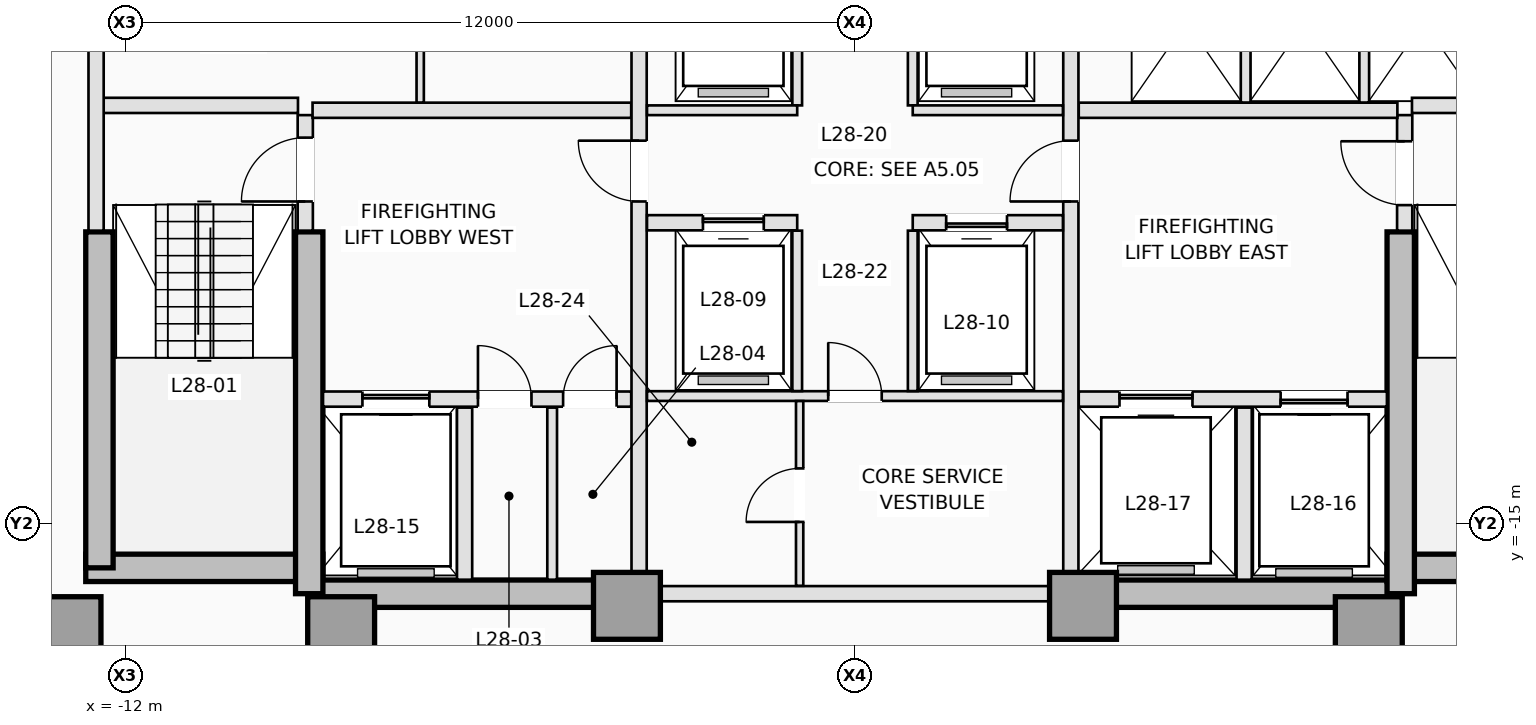
"""IFC4 building model, lengths in metres.
Left out: names, types, materials, properties, quantities, classifications, styles, units other than length and angle.
Written with IfcOpenShell. Run it as: python <this file> out.ifc"""

import sys

from ifc_helpers import new_model, si_unit, direction, frame, frame_2d, origin, origin_2d, place, context, subcontext, project, spatial, rectangle, extrude, element, fill, save


model = new_model("IFC4")
c1 = context("Model", 3, precision=1e-05, world=origin(), true_north=direction((0.0, 1.0)))
c2 = subcontext(c1, "Body", "Model", "MODEL_VIEW")
j1 = project(units=[si_unit("LENGTHUNIT", "METRE"), si_unit("PLANEANGLEUNIT", "RADIAN")], contexts=[c1])
p1 = place(None, origin())
s1 = spatial("IfcSite", under=j1, at=p1, CompositionType="ELEMENT")
p2 = place(p1, origin())
s2 = spatial("IfcBuilding", under=s1, at=p2, CompositionType="ELEMENT")
p3 = place(p2, frame((0.0, 0.0, 105.5)))
s3 = spatial("IfcBuildingStorey", under=s2, at=p3, CompositionType="ELEMENT", Elevation=105.5)
p4 = place(p3, frame((-12.65, -15.725, 0.0), z_axis=(0.0, 0.0, 1.0), x_axis=(1.0, 0.0, 0.0)))
e1 = element("IfcWall", 1, at=p4, inside=s3, PredefinedType="SHEAR", context=c2, shape_type="SweptSolid", body=[
    extrude(rectangle(XDim=3.9, YDim=0.45, at=frame_2d((1.95, 0.0))), origin(), (0.0, 0.0, 1.0), 3.5),
])
for number, where, z_axis, x_axis in (
    (2, (-8.975, -16.15, 0.0), (0.0, 0.0, 1.0), (1.0, 0.0, 0.0)),
    (3, (3.75, -16.15, 0.0), (0.0, 0.0, 1.0), (1.0, 0.0, 0.0)),
):
    element("IfcWall", number, at=place(p3, frame(where, z_axis=z_axis, x_axis=x_axis)), inside=s3, PredefinedType="SHEAR", context=c2, shape_type="SweptSolid", body=[
        extrude(rectangle(XDim=5.225, YDim=0.45, at=frame_2d((2.613, 0.0))), origin(), (0.0, 0.0, 1.0), 3.5),
    ])
p5 = place(p3, frame((8.75, -15.725, 0.0), z_axis=(0.0, 0.0, 1.0), x_axis=(1.0, 0.0, 0.0)))
e4 = element("IfcWall", 4, at=p5, inside=s3, PredefinedType="SHEAR", context=c2, shape_type="SweptSolid", body=[
    extrude(rectangle(XDim=3.9, YDim=0.45, at=frame_2d((1.95, 0.0))), origin(), (0.0, 0.0, 1.0), 3.5),
])
p6 = place(p3, frame((-12.425, -15.725, 0.0), z_axis=(0.0, 0.0, 1.0), x_axis=(0.0, 1.0, 0.0)))
e5 = element("IfcWall", 5, at=p6, inside=s3, PredefinedType="SHEAR", context=c2, shape_type="SweptSolid", body=[
    extrude(rectangle(XDim=5.525, YDim=0.45, at=frame_2d((2.763, 0.0))), origin(), (0.0, 0.0, 1.0), 3.5),
])
for number, where, z_axis, x_axis in (
    (6, (-8.975, -16.15, 0.0), (0.0, 0.0, 1.0), (0.0, 1.0, 0.0)),
    (7, (8.975, -16.15, 0.0), (0.0, 0.0, 1.0), (0.0, 1.0, 0.0)),
):
    element("IfcWall", number, at=place(p3, frame(where, z_axis=z_axis, x_axis=x_axis)), inside=s3, PredefinedType="SHEAR", context=c2, shape_type="SweptSolid", body=[
        extrude(rectangle(XDim=5.95, YDim=0.45, at=frame_2d((2.975, 0.0))), origin(), (0.0, 0.0, 1.0), 3.5),
    ])
for number, where, z_axis, x_axis in (
    (8, (-12.95, -16.75, 0.0), (0.0, 0.0, 1.0), (1.0, 0.0, 0.0)),
    (9, (-8.45, -16.75, 0.0), (0.0, 0.0, 1.0), (1.0, 0.0, 0.0)),
    (10, (-3.75, -16.35, 0.0), (0.0, 0.0, 1.0), (1.0, 0.0, 0.0)),
    (11, (3.75, -16.35, 0.0), (0.0, 0.0, 1.0), (1.0, 0.0, 0.0)),
    (12, (8.45, -16.75, 0.0), (0.0, 0.0, 1.0), (1.0, 0.0, 0.0)),
):
    element("IfcColumn", number, at=place(p3, frame(where, z_axis=z_axis, x_axis=x_axis)), inside=s3, PredefinedType="COLUMN", context=c2, shape_type="SweptSolid", body=[
        extrude(rectangle(XDim=1.1, YDim=1.1, at=origin_2d()), origin(), (0.0, 0.0, 1.0), 3.5),
    ])
p7 = place(p3, frame((-9.04, -10.18, 0.0), z_axis=(0.0, 0.0, 1.0), x_axis=(0.0, 1.0, 0.0)))
e13 = element("IfcWall", 13, at=p7, inside=s3, PredefinedType="PARTITIONING", context=c2, shape_type="SweptSolid", body=[
    extrude(rectangle(XDim=1.9, YDim=0.25, at=frame_2d((0.95, 0.0))), origin(), (0.0, 0.0, 1.0), 3.25),
])
p8 = place(p7, frame((0.48, 0.0, 0.0)))
e14 = element("IfcOpeningElement", 14, at=p8, cuts=e13, PredefinedType="OPENING", context=c2, shape_type="SweptSolid", body=[
    extrude(rectangle(XDim=1.05, YDim=2.15, at=frame_2d((0.525, 1.075))), frame((0.0, 0.135, 0.0), z_axis=(0.0, -1.0, 0.0), x_axis=(1.0, 0.0, 0.0)), (0.0, 0.0, 1.0), 0.27),
])
p9 = place(p3, frame((9.04, -10.18, 0.0), z_axis=(0.0, 0.0, 1.0), x_axis=(0.0, 1.0, 0.0)))
e15 = element("IfcWall", 15, at=p9, inside=s3, PredefinedType="PARTITIONING", context=c2, shape_type="SweptSolid", body=[
    extrude(rectangle(XDim=1.9, YDim=0.25, at=frame_2d((0.95, 0.0))), origin(), (0.0, 0.0, 1.0), 3.25),
])
p10 = place(p9, frame((0.42, 0.0, 0.0)))
e16 = element("IfcOpeningElement", 16, at=p10, cuts=e15, PredefinedType="OPENING", context=c2, shape_type="SweptSolid", body=[
    extrude(rectangle(XDim=1.05, YDim=2.15, at=frame_2d((0.525, 1.075))), frame((0.0, 0.135, 0.0), z_axis=(0.0, -1.0, 0.0), x_axis=(1.0, 0.0, 0.0)), (0.0, 0.0, 1.0), 0.27),
])
for number, where, z_axis, x_axis in (
    (17, (-12.38, -8.12, 0.0), (0.0, 0.0, 1.0), (1.0, 0.0, 0.0)),
    (18, (9.16, -8.12, 0.0), (0.0, 0.0, 1.0), (1.0, 0.0, 0.0)),
):
    element("IfcWall", number, at=place(p3, frame(where, z_axis=z_axis, x_axis=x_axis)), inside=s3, PredefinedType="PARTITIONING", context=c2, shape_type="SweptSolid", body=[
        extrude(rectangle(XDim=3.22, YDim=0.25, at=frame_2d((1.61, 0.0))), origin(), (0.0, 0.0, 1.0), 3.25),
    ])
p11 = place(p3, frame((-12.48, -10.18, 0.0), z_axis=(0.0, 0.0, 1.0), x_axis=(0.0, 1.0, 0.0)))
e19 = element("IfcWall", 19, at=p11, inside=s3, PredefinedType="PARTITIONING", context=c2, shape_type="SweptSolid", body=[
    extrude(rectangle(XDim=4.828, YDim=0.25, at=frame_2d((2.414, 0.0))), origin(), (0.0, 0.0, 1.0), 3.25),
])
p12 = place(p3, frame((-8.748, -12.95, 0.0), z_axis=(0.0, 0.0, 1.0), x_axis=(1.0, 0.0, 0.0)))
e20 = element("IfcWall", 20, at=p12, inside=s3, PredefinedType="PARTITIONING", context=c2, shape_type="SweptSolid", body=[
    extrude(rectangle(XDim=5.068, YDim=0.25, at=frame_2d((2.534, 0.0))), origin(), (0.0, 0.0, 1.0), 3.25),
])
p13 = place(p12, frame((0.648, 0.0, 0.0)))
e21 = element("IfcOpeningElement", 21, at=p13, cuts=e20, PredefinedType="OPENING", context=c2, shape_type="SweptSolid", body=[
    extrude(rectangle(XDim=1.1, YDim=2.15, at=frame_2d((0.55, 1.075))), frame((0.0, 0.135, 0.0), z_axis=(0.0, -1.0, 0.0), x_axis=(1.0, 0.0, 0.0)), (0.0, 0.0, 1.0), 0.27),
])
p14 = place(p12, frame((2.548, 0.0, 0.0)))
e22 = element("IfcOpeningElement", 22, at=p14, cuts=e20, PredefinedType="OPENING", context=c2, shape_type="SweptSolid", body=[
    extrude(rectangle(XDim=0.88, YDim=2.1, at=frame_2d((0.44, 1.05))), frame((0.0, 0.135, 0.0), z_axis=(0.0, -1.0, 0.0), x_axis=(1.0, 0.0, 0.0)), (0.0, 0.0, 1.0), 0.27),
])
p15 = place(p12, frame((3.948, 0.0, 0.0)))
e23 = element("IfcOpeningElement", 23, at=p15, cuts=e20, PredefinedType="OPENING", context=c2, shape_type="SweptSolid", body=[
    extrude(rectangle(XDim=0.88, YDim=2.1, at=frame_2d((0.44, 1.05))), frame((0.0, 0.135, 0.0), z_axis=(0.0, -1.0, 0.0), x_axis=(1.0, 0.0, 0.0)), (0.0, 0.0, 1.0), 0.27),
])
p16 = place(p3, frame((3.68, -12.95, 0.0), z_axis=(0.0, 0.0, 1.0), x_axis=(1.0, 0.0, 0.0)))
e24 = element("IfcWall", 24, at=p16, inside=s3, PredefinedType="PARTITIONING", context=c2, shape_type="SweptSolid", body=[
    extrude(rectangle(XDim=5.068, YDim=0.25, at=frame_2d((2.534, 0.0))), origin(), (0.0, 0.0, 1.0), 3.25),
])
p17 = place(p16, frame((3.32, 0.0, 0.0)))
e25 = element("IfcOpeningElement", 25, at=p17, cuts=e24, PredefinedType="OPENING", context=c2, shape_type="SweptSolid", body=[
    extrude(rectangle(XDim=1.1, YDim=2.15, at=frame_2d((0.55, 1.075))), frame((0.0, 0.135, 0.0), z_axis=(0.0, -1.0, 0.0), x_axis=(1.0, 0.0, 0.0)), (0.0, 0.0, 1.0), 0.27),
])
p18 = place(p16, frame((0.67, 0.0, 0.0)))
e26 = element("IfcOpeningElement", 26, at=p18, cuts=e24, PredefinedType="OPENING", context=c2, shape_type="SweptSolid", body=[
    extrude(rectangle(XDim=1.2, YDim=2.15, at=frame_2d((0.6, 1.075))), frame((0.0, 0.135, 0.0), z_axis=(0.0, -1.0, 0.0), x_axis=(1.0, 0.0, 0.0)), (0.0, 0.0, 1.0), 0.27),
])
p19 = place(p3, frame((-6.42, -15.92, 0.0), z_axis=(0.0, 0.0, 1.0), x_axis=(0.0, 1.0, 0.0)))
e27 = element("IfcWall", 27, at=p19, inside=s3, PredefinedType="PARTITIONING", context=c2, shape_type="SweptSolid", body=[
    extrude(rectangle(XDim=2.83, YDim=0.25, at=frame_2d((1.415, 0.0))), origin(), (0.0, 0.0, 1.0), 3.25),
])
p20 = place(p3, frame((-4.98, -15.92, 0.0), z_axis=(0.0, 0.0, 1.0), x_axis=(0.0, 1.0, 0.0)))
e28 = element("IfcWall", 28, at=p20, inside=s3, PredefinedType="PARTITIONING", context=c2, shape_type="SweptSolid", body=[
    extrude(rectangle(XDim=2.83, YDim=0.16, at=frame_2d((1.415, 0.0))), origin(), (0.0, 0.0, 1.0), 3.25),
])
p21 = place(p3, frame((6.4, -15.92, 0.0), z_axis=(0.0, 0.0, 1.0), x_axis=(0.0, 1.0, 0.0)))
e29 = element("IfcWall", 29, at=p21, inside=s3, PredefinedType="PARTITIONING", context=c2, shape_type="SweptSolid", body=[
    extrude(rectangle(XDim=2.83, YDim=0.25, at=frame_2d((1.415, 0.0))), origin(), (0.0, 0.0, 1.0), 3.25),
])
for number, where, z_axis, x_axis in (
    (30, (-8.92, -8.2, 0.0), (0.0, 0.0, 1.0), (1.0, 0.0, 0.0)),
    (31, (3.68, -8.2, 0.0), (0.0, 0.0, 1.0), (1.0, 0.0, 0.0)),
):
    element("IfcWall", number, at=place(p3, frame(where, z_axis=z_axis, x_axis=x_axis)), inside=s3, PredefinedType="PARTITIONING", context=c2, shape_type="SweptSolid", body=[
        extrude(rectangle(XDim=5.24, YDim=0.25, at=frame_2d((2.62, 0.0))), origin(), (0.0, 0.0, 1.0), 3.25),
    ])
p22 = place(p3, frame((-3.55, -15.798, 0.0), z_axis=(0.0, 0.0, 1.0), x_axis=(0.0, 1.0, 0.0)))
e32 = element("IfcWall", 32, at=p22, inside=s3, PredefinedType="PARTITIONING", context=c2, shape_type="SweptSolid", body=[
    extrude(rectangle(XDim=10.446, YDim=0.25, at=frame_2d((5.223, 0.0))), origin(), (0.0, 0.0, 1.0), 3.25),
])
p23 = place(p22, frame((6.098, 0.0, 0.0)))
e33 = element("IfcOpeningElement", 33, at=p23, cuts=e32, PredefinedType="OPENING", context=c2, shape_type="SweptSolid", body=[
    extrude(rectangle(XDim=1.0, YDim=2.15, at=frame_2d((0.5, 1.075))), frame((0.0, 0.135, 0.0), z_axis=(0.0, -1.0, 0.0), x_axis=(1.0, 0.0, 0.0)), (0.0, 0.0, 1.0), 0.27),
])
p24 = place(p3, frame((3.55, -15.798, 0.0), z_axis=(0.0, 0.0, 1.0), x_axis=(0.0, 1.0, 0.0)))
e34 = element("IfcWall", 34, at=p24, inside=s3, PredefinedType="PARTITIONING", context=c2, shape_type="SweptSolid", body=[
    extrude(rectangle(XDim=10.446, YDim=0.25, at=frame_2d((5.223, 0.0))), origin(), (0.0, 0.0, 1.0), 3.25),
])
p25 = place(p24, frame((6.098, 0.0, 0.0)))
e35 = element("IfcOpeningElement", 35, at=p25, cuts=e34, PredefinedType="OPENING", context=c2, shape_type="SweptSolid", body=[
    extrude(rectangle(XDim=1.0, YDim=2.15, at=frame_2d((0.5, 1.075))), frame((0.0, 0.135, 0.0), z_axis=(0.0, -1.0, 0.0), x_axis=(1.0, 0.0, 0.0)), (0.0, 0.0, 1.0), 0.27),
])
p26 = place(p3, frame((-7.15, -8.073, 0.0), z_axis=(0.0, 0.0, 1.0), x_axis=(0.0, 1.0, 0.0)))
e36 = element("IfcWall", 36, at=p26, inside=s3, PredefinedType="PARTITIONING", context=c2, shape_type="SweptSolid", body=[
    extrude(rectangle(XDim=2.733, YDim=0.12, at=frame_2d((1.366, 0.0))), origin(), (0.0, 0.0, 1.0), 3.25),
])
for number, where, z_axis, x_axis in (
    (37, (6.425, -8.073, 0.0), (0.0, 0.0, 1.0), (0.0, 1.0, 0.0)),
    (38, (8.375, -8.073, 0.0), (0.0, 0.0, 1.0), (0.0, 1.0, 0.0)),
):
    element("IfcWall", number, at=place(p3, frame(where, z_axis=z_axis, x_axis=x_axis)), inside=s3, PredefinedType="PARTITIONING", context=c2, shape_type="SweptSolid", body=[
        extrude(rectangle(XDim=2.733, YDim=0.16, at=frame_2d((1.366, 0.0))), origin(), (0.0, 0.0, 1.0), 3.25),
    ])
p27 = place(p3, frame((-3.198, -16.15, 0.0), z_axis=(0.0, 0.0, 1.0), x_axis=(1.0, 0.0, 0.0)))
e39 = element("IfcWall", 39, at=p27, inside=s3, PredefinedType="PARTITIONING", context=c2, shape_type="SweptSolid", body=[
    extrude(rectangle(XDim=6.396, YDim=0.25, at=frame_2d((3.198, 0.0))), origin(), (0.0, 0.0, 1.0), 2.3),
])
for number, where, z_axis, x_axis in (
    (40, (-0.95, -8.12, 0.0), (0.0, 0.0, 1.0), (0.0, 1.0, 0.0)),
    (41, (0.95, -8.12, 0.0), (0.0, 0.0, 1.0), (0.0, 1.0, 0.0)),
):
    element("IfcWall", number, at=place(p3, frame(where, z_axis=z_axis, x_axis=x_axis)), inside=s3, PredefinedType="PARTITIONING", context=c2, shape_type="SweptSolid", body=[
        extrude(rectangle(XDim=2.78, YDim=0.16, at=frame_2d((1.39, 0.0))), origin(), (0.0, 0.0, 1.0), 3.25),
    ])
for number, where, z_axis, x_axis in (
    (42, (-3.42, -8.2, 0.0), (0.0, 0.0, 1.0), (1.0, 0.0, 0.0)),
    (43, (0.95, -8.2, 0.0), (0.0, 0.0, 1.0), (1.0, 0.0, 0.0)),
):
    element("IfcWall", number, at=place(p3, frame(where, z_axis=z_axis, x_axis=x_axis)), inside=s3, PredefinedType="PARTITIONING", context=c2, shape_type="SweptSolid", body=[
        extrude(rectangle(XDim=2.47, YDim=0.16, at=frame_2d((1.235, 0.0))), origin(), (0.0, 0.0, 1.0), 3.25),
    ])
p28 = place(p3, frame((-3.42, -10.05, 0.0), z_axis=(0.0, 0.0, 1.0), x_axis=(1.0, 0.0, 0.0)))
e44 = element("IfcWall", 44, at=p28, inside=s3, PredefinedType="PARTITIONING", context=c2, shape_type="SweptSolid", body=[
    extrude(rectangle(XDim=2.47, YDim=0.25, at=frame_2d((1.235, 0.0))), origin(), (0.0, 0.0, 1.0), 3.25),
])
p29 = place(p28, frame((0.92, 0.0, 0.0)))
e45 = element("IfcOpeningElement", 45, at=p29, cuts=e44, PredefinedType="OPENING", context=c2, shape_type="SweptSolid", body=[
    extrude(rectangle(XDim=1.0, YDim=2.15, at=frame_2d((0.5, 1.075))), frame((0.0, 0.135, 0.0), z_axis=(0.0, -1.0, 0.0), x_axis=(1.0, 0.0, 0.0)), (0.0, 0.0, 1.0), 0.27),
])
p30 = place(p3, frame((0.95, -10.05, 0.0), z_axis=(0.0, 0.0, 1.0), x_axis=(1.0, 0.0, 0.0)))
e46 = element("IfcWall", 46, at=p30, inside=s3, PredefinedType="PARTITIONING", context=c2, shape_type="SweptSolid", body=[
    extrude(rectangle(XDim=2.47, YDim=0.25, at=frame_2d((1.235, 0.0))), origin(), (0.0, 0.0, 1.0), 3.25),
])
p31 = place(p30, frame((0.55, 0.0, 0.0)))
e47 = element("IfcOpeningElement", 47, at=p31, cuts=e46, PredefinedType="OPENING", context=c2, shape_type="SweptSolid", body=[
    extrude(rectangle(XDim=1.0, YDim=2.15, at=frame_2d((0.5, 1.075))), frame((0.0, 0.135, 0.0), z_axis=(0.0, -1.0, 0.0), x_axis=(1.0, 0.0, 0.0)), (0.0, 0.0, 1.0), 0.27),
])
p32 = place(p3, frame((-3.42, -12.9, 0.0), z_axis=(0.0, 0.0, 1.0), x_axis=(1.0, 0.0, 0.0)))
e48 = element("IfcWall", 48, at=p32, inside=s3, PredefinedType="PARTITIONING", context=c2, shape_type="SweptSolid", body=[
    extrude(rectangle(XDim=6.84, YDim=0.16, at=frame_2d((3.42, 0.0))), origin(), (0.0, 0.0, 1.0), 3.25),
])
p33 = place(p32, frame((2.98, 0.0, 0.0)))
e49 = element("IfcOpeningElement", 49, at=p33, cuts=e48, PredefinedType="OPENING", context=c2, shape_type="SweptSolid", body=[
    extrude(rectangle(XDim=0.88, YDim=2.12, at=frame_2d((0.44, 1.06))), frame((0.0, 0.09, 0.0), z_axis=(0.0, -1.0, 0.0), x_axis=(1.0, 0.0, 0.0)), (0.0, 0.0, 1.0), 0.18),
])
for number, where, z_axis, x_axis in (
    (50, (-0.95, -12.818, 0.0), (0.0, 0.0, 1.0), (0.0, 1.0, 0.0)),
    (51, (0.95, -12.818, 0.0), (0.0, 0.0, 1.0), (0.0, 1.0, 0.0)),
):
    element("IfcWall", number, at=place(p3, frame(where, z_axis=z_axis, x_axis=x_axis)), inside=s3, PredefinedType="PARTITIONING", context=c2, shape_type="SweptSolid", body=[
        extrude(rectangle(XDim=2.638, YDim=0.16, at=frame_2d((1.319, 0.0))), origin(), (0.0, 0.0, 1.0), 3.25),
    ])
p34 = place(p3, frame((-0.91, -16.02, 0.0), z_axis=(0.0, 0.0, 1.0), x_axis=(0.0, 1.0, 0.0)))
e52 = element("IfcWall", 52, at=p34, inside=s3, PredefinedType="PARTITIONING", context=c2, shape_type="SweptSolid", body=[
    extrude(rectangle(XDim=3.038, YDim=0.12, at=frame_2d((1.519, 0.0))), origin(), (0.0, 0.0, 1.0), 3.25),
])
p35 = place(p34, frame((1.05, 0.0, 0.0)))
e53 = element("IfcOpeningElement", 53, at=p35, cuts=e52, PredefinedType="OPENING", context=c2, shape_type="SweptSolid", body=[
    extrude(rectangle(XDim=0.88, YDim=2.12, at=frame_2d((0.44, 1.06))), frame((0.0, 0.07, 0.0), z_axis=(0.0, -1.0, 0.0), x_axis=(1.0, 0.0, 0.0)), (0.0, 0.0, 1.0), 0.14),
])
p36 = place(p13, origin())
e54 = element("IfcDoor", 54, at=p36, inside=s3, OperationType="SLIDING_TO_LEFT", PredefinedType="DOOR", context=c2, shape_type="SweptSolid", body=[
    extrude(rectangle(XDim=1.1, YDim=2.15, at=frame_2d((0.55, 1.075))), frame((0.0, 0.025, 0.0), z_axis=(0.0, -1.0, 0.0), x_axis=(1.0, 0.0, 0.0)), (0.0, 0.0, 1.0), 0.05),
])
fill(e21, e54)
p37 = place(p17, origin())
e55 = element("IfcDoor", 55, at=p37, inside=s3, OperationType="SLIDING_TO_RIGHT", PredefinedType="DOOR", context=c2, shape_type="SweptSolid", body=[
    extrude(rectangle(XDim=1.1, YDim=2.15, at=frame_2d((0.55, 1.075))), frame((0.0, 0.025, 0.0), z_axis=(0.0, -1.0, 0.0), x_axis=(1.0, 0.0, 0.0)), (0.0, 0.0, 1.0), 0.05),
])
fill(e25, e55)
p38 = place(p18, origin())
e56 = element("IfcDoor", 56, at=p38, inside=s3, OperationType="SLIDING_TO_LEFT", PredefinedType="DOOR", context=c2, shape_type="SweptSolid", body=[
    extrude(rectangle(XDim=1.2, YDim=2.15, at=frame_2d((0.6, 1.075))), frame((0.0, 0.025, 0.0), z_axis=(0.0, -1.0, 0.0), x_axis=(1.0, 0.0, 0.0)), (0.0, 0.0, 1.0), 0.05),
])
fill(e26, e56)
p39 = place(p29, origin())
e57 = element("IfcDoor", 57, at=p39, inside=s3, OperationType="SLIDING_TO_LEFT", PredefinedType="DOOR", context=c2, shape_type="SweptSolid", body=[
    extrude(rectangle(XDim=1.0, YDim=2.15, at=frame_2d((0.5, 1.075))), frame((0.0, 0.025, 0.0), z_axis=(0.0, -1.0, 0.0), x_axis=(1.0, 0.0, 0.0)), (0.0, 0.0, 1.0), 0.05),
])
fill(e45, e57)
p40 = place(p31, origin())
e58 = element("IfcDoor", 58, at=p40, inside=s3, OperationType="SLIDING_TO_RIGHT", PredefinedType="DOOR", context=c2, shape_type="SweptSolid", body=[
    extrude(rectangle(XDim=1.0, YDim=2.15, at=frame_2d((0.5, 1.075))), frame((0.0, 0.025, 0.0), z_axis=(0.0, -1.0, 0.0), x_axis=(1.0, 0.0, 0.0)), (0.0, 0.0, 1.0), 0.05),
])
fill(e47, e58)
p41 = place(p8, origin())
e59 = element("IfcDoor", 59, at=p41, inside=s3, OperationType="SINGLE_SWING_LEFT", PredefinedType="DOOR", context=c2, shape_type="SweptSolid", body=[
    extrude(rectangle(XDim=1.05, YDim=2.15, at=frame_2d((0.525, 1.075))), frame((0.0, 0.025, 0.0), z_axis=(0.0, -1.0, 0.0), x_axis=(1.0, 0.0, 0.0)), (0.0, 0.0, 1.0), 0.05),
])
fill(e14, e59)
p42 = place(p10, origin())
e60 = element("IfcDoor", 60, at=p42, inside=s3, OperationType="SINGLE_SWING_RIGHT", PredefinedType="DOOR", context=c2, shape_type="SweptSolid", body=[
    extrude(rectangle(XDim=1.05, YDim=2.15, at=frame_2d((0.525, 1.075))), frame((0.0, 0.025, 0.0), z_axis=(0.0, -1.0, 0.0), x_axis=(1.0, 0.0, 0.0)), (0.0, 0.0, 1.0), 0.05),
])
fill(e16, e60)
p43 = place(p14, origin())
e61 = element("IfcDoor", 61, at=p43, inside=s3, OperationType="SINGLE_SWING_LEFT", PredefinedType="TRAPDOOR", context=c2, shape_type="SweptSolid", body=[
    extrude(rectangle(XDim=0.88, YDim=2.1, at=frame_2d((0.44, 1.05))), frame((0.0, 0.025, 0.0), z_axis=(0.0, -1.0, 0.0), x_axis=(1.0, 0.0, 0.0)), (0.0, 0.0, 1.0), 0.05),
])
fill(e22, e61)
p44 = place(p15, origin())
e62 = element("IfcDoor", 62, at=p44, inside=s3, OperationType="SINGLE_SWING_RIGHT", PredefinedType="TRAPDOOR", context=c2, shape_type="SweptSolid", body=[
    extrude(rectangle(XDim=0.88, YDim=2.1, at=frame_2d((0.44, 1.05))), frame((0.0, 0.025, 0.0), z_axis=(0.0, -1.0, 0.0), x_axis=(1.0, 0.0, 0.0)), (0.0, 0.0, 1.0), 0.05),
])
fill(e23, e62)
p45 = place(p23, origin())
e63 = element("IfcDoor", 63, at=p45, inside=s3, OperationType="SINGLE_SWING_RIGHT", PredefinedType="DOOR", context=c2, shape_type="SweptSolid", body=[
    extrude(rectangle(XDim=1.0, YDim=2.15, at=frame_2d((0.5, 1.075))), frame((0.0, 0.025, 0.0), z_axis=(0.0, -1.0, 0.0), x_axis=(1.0, 0.0, 0.0)), (0.0, 0.0, 1.0), 0.05),
])
fill(e33, e63)
p46 = place(p25, origin())
e64 = element("IfcDoor", 64, at=p46, inside=s3, OperationType="SINGLE_SWING_LEFT", PredefinedType="DOOR", context=c2, shape_type="SweptSolid", body=[
    extrude(rectangle(XDim=1.0, YDim=2.15, at=frame_2d((0.5, 1.075))), frame((0.0, 0.025, 0.0), z_axis=(0.0, -1.0, 0.0), x_axis=(1.0, 0.0, 0.0)), (0.0, 0.0, 1.0), 0.05),
])
fill(e35, e64)
p47 = place(p33, origin())
e65 = element("IfcDoor", 65, at=p47, inside=s3, OperationType="SINGLE_SWING_LEFT", PredefinedType="DOOR", context=c2, shape_type="SweptSolid", body=[
    extrude(rectangle(XDim=0.88, YDim=2.12, at=frame_2d((0.44, 1.06))), frame((0.0, 0.025, 0.0), z_axis=(0.0, -1.0, 0.0), x_axis=(1.0, 0.0, 0.0)), (0.0, 0.0, 1.0), 0.05),
])
fill(e49, e65)
p48 = place(p35, origin())
e66 = element("IfcDoor", 66, at=p48, inside=s3, OperationType="SINGLE_SWING_LEFT", PredefinedType="DOOR", context=c2, shape_type="SweptSolid", body=[
    extrude(rectangle(XDim=0.88, YDim=2.12, at=frame_2d((0.44, 1.06))), frame((0.0, 0.025, 0.0), z_axis=(0.0, -1.0, 0.0), x_axis=(1.0, 0.0, 0.0)), (0.0, 0.0, 1.0), 0.05),
])
fill(e53, e66)
save(model, sys.argv[1])
